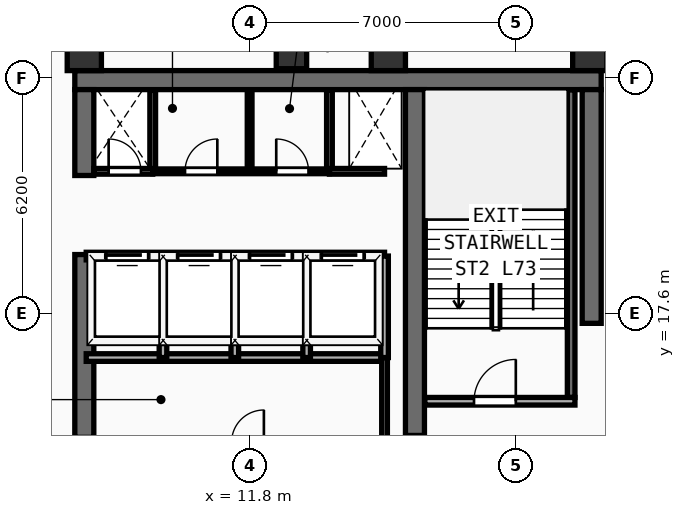
"""IFC4 building model, lengths in metres.
Left out: names, types, materials, properties, quantities, classifications, styles, units other than length and angle.
Written with IfcOpenShell. Run it as: python <this file> out.ifc"""

import sys

from ifc_helpers import new_model, si_unit, direction, frame, frame_2d, origin, origin_2d, place, context, subcontext, project, spatial, rectangle, extrude, element, fill, save


model = new_model("IFC4")
c1 = context("Model", 3, precision=1e-05, world=origin(), true_north=direction((0.0, 1.0)))
c2 = subcontext(c1, "Body", "Model", "MODEL_VIEW")
j1 = project(units=[si_unit("LENGTHUNIT", "METRE"), si_unit("PLANEANGLEUNIT", "RADIAN")], contexts=[c1])
p1 = place(None, origin())
s1 = spatial("IfcSite", under=j1, at=p1, CompositionType="ELEMENT")
p2 = place(p1, origin())
s2 = spatial("IfcBuilding", under=s1, at=p2, CompositionType="ELEMENT")
p3 = place(p2, frame((0.0, 0.0, 285.6)))
s3 = spatial("IfcBuildingStorey", under=s2, at=p3, CompositionType="ELEMENT", Elevation=285.6)
p4 = place(p3, frame((7.2, 23.75, 0.0), z_axis=(0.0, 0.0, 1.0), x_axis=(1.0, 0.0, 0.0)))
e1 = element("IfcWall", 1, at=p4, inside=s3, PredefinedType="SHEAR", context=c2, shape_type="SweptSolid", body=[
    extrude(rectangle(XDim=13.85, YDim=0.5, at=frame_2d((6.925, 0.0))), origin(), (0.0, 0.0, 1.0), 3.56),
])
p5 = place(p3, frame((7.45, 14.35, 0.0), z_axis=(0.0, 0.0, 1.0), x_axis=(0.0, 1.0, 0.0)))
e2 = element("IfcWall", 2, at=p5, inside=s3, PredefinedType="SHEAR", context=c2, shape_type="SweptSolid", body=[
    extrude(rectangle(XDim=4.81, YDim=0.5, at=frame_2d((2.405, 0.0))), origin(), (0.0, 0.0, 1.0), 3.56),
])
p6 = place(p3, frame((7.45, 21.24, 0.0), z_axis=(0.0, 0.0, 1.0), x_axis=(0.0, 1.0, 0.0)))
e3 = element("IfcWall", 3, at=p6, inside=s3, PredefinedType="SHEAR", context=c2, shape_type="SweptSolid", body=[
    extrude(rectangle(XDim=2.26, YDim=0.5, at=frame_2d((1.13, 0.0))), origin(), (0.0, 0.0, 1.0), 3.56),
])
p7 = place(p3, frame((20.8, 17.35, 0.0), z_axis=(0.0, 0.0, 1.0), x_axis=(0.0, 1.0, 0.0)))
e4 = element("IfcWall", 4, at=p7, inside=s3, PredefinedType="SHEAR", context=c2, shape_type="SweptSolid", body=[
    extrude(rectangle(XDim=6.15, YDim=0.5, at=frame_2d((3.075, 0.0))), origin(), (0.0, 0.0, 1.0), 3.56),
])
p8 = place(p3, frame((16.15, 14.4, 0.0), z_axis=(0.0, 0.0, 1.0), x_axis=(0.0, 1.0, 0.0)))
e5 = element("IfcWall", 5, at=p8, inside=s3, PredefinedType="SHEAR", context=c2, shape_type="SweptSolid", body=[
    extrude(rectangle(XDim=9.1, YDim=0.5, at=frame_2d((4.55, 0.0))), origin(), (0.0, 0.0, 1.0), 3.56),
])
for number, where, z_axis, x_axis in (
    (6, (7.45, 24.45, 0.0), (0.0, 0.0, 1.0), (1.0, 0.0, 0.0)),
    (7, (15.45, 24.45, 0.0), (0.0, 0.0, 1.0), (1.0, 0.0, 0.0)),
    (8, (20.75, 24.45, 0.0), (0.0, 0.0, 1.0), (1.0, 0.0, 0.0)),
):
    element("IfcColumn", number, at=place(p3, frame(where, z_axis=z_axis, x_axis=x_axis)), inside=s3, PredefinedType="COLUMN", context=c2, shape_type="SweptSolid", body=[
        extrude(rectangle(XDim=0.9, YDim=0.9, at=origin_2d()), origin(), (0.0, 0.0, 1.0), 3.56),
    ])
p9 = place(p3, frame((12.9, 24.45, 0.0), z_axis=(0.0, 0.0, 1.0), x_axis=(1.0, 0.0, 0.0)))
e9 = element("IfcColumn", 9, at=p9, inside=s3, PredefinedType="COLUMN", context=c2, shape_type="SweptSolid", body=[
    extrude(rectangle(XDim=0.8, YDim=0.8, at=origin_2d()), origin(), (0.0, 0.0, 1.0), 3.56),
])
p10 = place(p3, frame((27.622, 19.712, 0.0), z_axis=(0.0, 0.0, 1.0), x_axis=(-0.707120040392, 0.707093521733, 0.0)))
e10 = element("IfcWall", 10, at=p10, inside=s3, PredefinedType="SOLIDWALL", context=c2, shape_type="SweptSolid", body=[
    extrude(rectangle(XDim=9.206, YDim=0.28, at=frame_2d((4.603, 0.0))), origin(), (0.0, 0.0, 1.0), 3.56),
])
p11 = place(p3, frame((20.26, 15.4, 0.0), z_axis=(0.0, 0.0, 1.0), x_axis=(0.0, 1.0, 0.0)))
e11 = element("IfcWall", 11, at=p11, inside=s3, PredefinedType="SHEAR", context=c2, shape_type="SweptSolid", body=[
    extrude(rectangle(XDim=8.09, YDim=0.2, at=frame_2d((4.045, 0.0))), origin(), (0.0, 0.0, 1.0), 3.56),
])
p12 = place(p3, frame((16.41, 15.3, 0.0), z_axis=(0.0, 0.0, 1.0), x_axis=(1.0, 0.0, 0.0)))
e12 = element("IfcWall", 12, at=p12, inside=s3, PredefinedType="PARTITIONING", context=c2, shape_type="SweptSolid", body=[
    extrude(rectangle(XDim=3.95, YDim=0.2, at=frame_2d((1.975, 0.0))), origin(), (0.0, 0.0, 1.0), 3.56),
])
p13 = place(p12, frame((1.294, 0.0, 0.0)))
e13 = element("IfcOpeningElement", 13, at=p13, cuts=e12, PredefinedType="OPENING", context=c2, shape_type="SweptSolid", body=[
    extrude(rectangle(XDim=1.1, YDim=2.2, at=frame_2d((0.55, 1.1))), frame((0.0, 0.11, 0.0), z_axis=(0.0, -1.0, 0.0), x_axis=(1.0, 0.0, 0.0)), (0.0, 0.0, 1.0), 0.22),
])
p14 = place(p3, frame((7.5, 16.45, 0.0), z_axis=(0.0, 0.0, 1.0), x_axis=(1.0, 0.0, 0.0)))
e14 = element("IfcWall", 14, at=p14, inside=s3, PredefinedType="PARTITIONING", context=c2, shape_type="SweptSolid", body=[
    extrude(rectangle(XDim=7.85, YDim=0.2, at=frame_2d((3.925, 0.0))), origin(), (0.0, 0.0, 1.0), 3.56),
])
p15 = place(p3, frame((15.35, 14.22, 0.0), z_axis=(0.0, 0.0, 1.0), x_axis=(0.0, 1.0, 0.0)))
e15 = element("IfcWall", 15, at=p15, inside=s3, PredefinedType="PARTITIONING", context=c2, shape_type="SweptSolid", body=[
    extrude(rectangle(XDim=2.23, YDim=0.15, at=frame_2d((1.115, 0.0))), origin(), (0.0, 0.0, 1.0), 3.56),
])
p16 = place(p3, frame((7.5, 19.12, 0.0), z_axis=(0.0, 0.0, 1.0), x_axis=(1.0, 0.0, 0.0)))
e16 = element("IfcWall", 16, at=p16, inside=s3, PredefinedType="PARTITIONING", context=c2, shape_type="SweptSolid", body=[
    extrude(rectangle(XDim=7.85, YDim=0.2, at=frame_2d((3.925, 0.0))), origin(), (0.0, 0.0, 1.0), 3.56),
])
p17 = place(p16, frame((0.53, 0.0, 0.0)))
e17 = element("IfcOpeningElement", 17, at=p17, cuts=e16, PredefinedType="OPENING", context=c2, shape_type="SweptSolid", body=[
    extrude(rectangle(XDim=1.1, YDim=2.2, at=frame_2d((0.55, 1.1))), frame((0.0, 0.11, 0.0), z_axis=(0.0, -1.0, 0.0), x_axis=(1.0, 0.0, 0.0)), (0.0, 0.0, 1.0), 0.22),
])
p18 = place(p16, frame((2.42, 0.0, 0.0)))
e18 = element("IfcOpeningElement", 18, at=p18, cuts=e16, PredefinedType="OPENING", context=c2, shape_type="SweptSolid", body=[
    extrude(rectangle(XDim=1.1, YDim=2.2, at=frame_2d((0.55, 1.1))), frame((0.0, 0.11, 0.0), z_axis=(0.0, -1.0, 0.0), x_axis=(1.0, 0.0, 0.0)), (0.0, 0.0, 1.0), 0.22),
])
p19 = place(p16, frame((4.31, 0.0, 0.0)))
e19 = element("IfcOpeningElement", 19, at=p19, cuts=e16, PredefinedType="OPENING", context=c2, shape_type="SweptSolid", body=[
    extrude(rectangle(XDim=1.1, YDim=2.2, at=frame_2d((0.55, 1.1))), frame((0.0, 0.11, 0.0), z_axis=(0.0, -1.0, 0.0), x_axis=(1.0, 0.0, 0.0)), (0.0, 0.0, 1.0), 0.22),
])
p20 = place(p16, frame((6.2, 0.0, 0.0)))
e20 = element("IfcOpeningElement", 20, at=p20, cuts=e16, PredefinedType="OPENING", context=c2, shape_type="SweptSolid", body=[
    extrude(rectangle(XDim=1.1, YDim=2.2, at=frame_2d((0.55, 1.1))), frame((0.0, 0.11, 0.0), z_axis=(0.0, -1.0, 0.0), x_axis=(1.0, 0.0, 0.0)), (0.0, 0.0, 1.0), 0.22),
])
for number, where, z_axis, x_axis in (
    (21, (15.35, 16.45, 0.0), (0.0, 0.0, 1.0), (0.0, 1.0, 0.0)),
    (22, (9.52, 16.45, 0.0), (0.0, 0.0, 1.0), (0.0, 1.0, 0.0)),
    (23, (11.41, 16.45, 0.0), (0.0, 0.0, 1.0), (0.0, 1.0, 0.0)),
    (24, (13.3, 16.45, 0.0), (0.0, 0.0, 1.0), (0.0, 1.0, 0.0)),
):
    element("IfcWall", number, at=place(p3, frame(where, z_axis=z_axis, x_axis=x_axis)), inside=s3, PredefinedType="PARTITIONING", context=c2, shape_type="SweptSolid", body=[
        extrude(rectangle(XDim=2.67, YDim=0.2, at=frame_2d((1.335, 0.0))), origin(), (0.0, 0.0, 1.0), 3.56),
    ])
for number, where, z_axis, x_axis in (
    (25, (9.25, 21.35, 0.0), (0.0, 0.0, 1.0), (0.0, 1.0, 0.0)),
    (26, (13.9, 21.35, 0.0), (0.0, 0.0, 1.0), (0.0, 1.0, 0.0)),
):
    element("IfcWall", number, at=place(p3, frame(where, z_axis=z_axis, x_axis=x_axis)), inside=s3, PredefinedType="PARTITIONING", context=c2, shape_type="SweptSolid", body=[
        extrude(rectangle(XDim=2.13, YDim=0.15, at=frame_2d((1.065, 0.0))), origin(), (0.0, 0.0, 1.0), 3.56),
    ])
p21 = place(p3, frame((7.7, 21.35, 0.0), z_axis=(0.0, 0.0, 1.0), x_axis=(1.0, 0.0, 0.0)))
e27 = element("IfcWall", 27, at=p21, inside=s3, PredefinedType="PARTITIONING", context=c2, shape_type="SweptSolid", body=[
    extrude(rectangle(XDim=1.55, YDim=0.15, at=frame_2d((0.775, 0.0))), origin(), (0.0, 0.0, 1.0), 3.56),
])
p22 = place(p21, frame((0.39, 0.0, 0.0)))
e28 = element("IfcOpeningElement", 28, at=p22, cuts=e27, PredefinedType="OPENING", context=c2, shape_type="SweptSolid", body=[
    extrude(rectangle(XDim=0.85, YDim=2.15, at=frame_2d((0.425, 1.075))), frame((0.0, 0.085, 0.0), z_axis=(0.0, -1.0, 0.0), x_axis=(1.0, 0.0, 0.0)), (0.0, 0.0, 1.0), 0.17),
])
p23 = place(p3, frame((13.9, 21.35, 0.0), z_axis=(0.0, 0.0, 1.0), x_axis=(1.0, 0.0, 0.0)))
e29 = element("IfcWall", 29, at=p23, inside=s3, PredefinedType="PARTITIONING", context=c2, shape_type="SweptSolid", body=[
    extrude(rectangle(XDim=1.45, YDim=0.15, at=frame_2d((0.725, 0.0))), origin(), (0.0, 0.0, 1.0), 3.56),
])
p24 = place(p3, frame((9.25, 21.35, 0.0), z_axis=(0.0, 0.0, 1.0), x_axis=(1.0, 0.0, 0.0)))
e30 = element("IfcWall", 30, at=p24, inside=s3, PredefinedType="PARTITIONING", context=c2, shape_type="SweptSolid", body=[
    extrude(rectangle(XDim=4.65, YDim=0.125, at=frame_2d((2.325, 0.0))), origin(), (0.0, 0.0, 1.0), 3.56),
])
p25 = place(p24, frame((0.85, 0.0, 0.0)))
e31 = element("IfcOpeningElement", 31, at=p25, cuts=e30, PredefinedType="OPENING", context=c2, shape_type="SweptSolid", body=[
    extrude(rectangle(XDim=0.85, YDim=2.15, at=frame_2d((0.425, 1.075))), frame((0.0, 0.073, 0.0), z_axis=(0.0, -1.0, 0.0), x_axis=(1.0, 0.0, 0.0)), (0.0, 0.0, 1.0), 0.145),
])
p26 = place(p24, frame((3.25, 0.0, 0.0)))
e32 = element("IfcOpeningElement", 32, at=p26, cuts=e30, PredefinedType="OPENING", context=c2, shape_type="SweptSolid", body=[
    extrude(rectangle(XDim=0.85, YDim=2.15, at=frame_2d((0.425, 1.075))), frame((0.0, 0.073, 0.0), z_axis=(0.0, -1.0, 0.0), x_axis=(1.0, 0.0, 0.0)), (0.0, 0.0, 1.0), 0.145),
])
p27 = place(p3, frame((11.8, 21.35, 0.0), z_axis=(0.0, 0.0, 1.0), x_axis=(0.0, 1.0, 0.0)))
e33 = element("IfcWall", 33, at=p27, inside=s3, PredefinedType="PARTITIONING", context=c2, shape_type="SweptSolid", body=[
    extrude(rectangle(XDim=2.13, YDim=0.125, at=frame_2d((1.065, 0.0))), origin(), (0.0, 0.0, 1.0), 3.56),
])
p28 = place(p13, origin())
e34 = element("IfcDoor", 34, at=p28, inside=s3, OperationType="SINGLE_SWING_RIGHT", PredefinedType="DOOR", context=c2, shape_type="SweptSolid", body=[
    extrude(rectangle(XDim=1.1, YDim=2.2, at=frame_2d((0.55, 1.1))), frame((0.0, 0.025, 0.0), z_axis=(0.0, -1.0, 0.0), x_axis=(1.0, 0.0, 0.0)), (0.0, 0.0, 1.0), 0.05),
])
fill(e13, e34)
p29 = place(p17, origin())
e35 = element("IfcDoor", 35, at=p29, inside=s3, OperationType="SLIDING_TO_LEFT", PredefinedType="DOOR", context=c2, shape_type="SweptSolid", body=[
    extrude(rectangle(XDim=1.1, YDim=2.2, at=frame_2d((0.55, 1.1))), frame((0.0, 0.025, 0.0), z_axis=(0.0, -1.0, 0.0), x_axis=(1.0, 0.0, 0.0)), (0.0, 0.0, 1.0), 0.05),
])
fill(e17, e35)
p30 = place(p18, origin())
e36 = element("IfcDoor", 36, at=p30, inside=s3, OperationType="SLIDING_TO_LEFT", PredefinedType="DOOR", context=c2, shape_type="SweptSolid", body=[
    extrude(rectangle(XDim=1.1, YDim=2.2, at=frame_2d((0.55, 1.1))), frame((0.0, 0.025, 0.0), z_axis=(0.0, -1.0, 0.0), x_axis=(1.0, 0.0, 0.0)), (0.0, 0.0, 1.0), 0.05),
])
fill(e18, e36)
p31 = place(p19, origin())
e37 = element("IfcDoor", 37, at=p31, inside=s3, OperationType="SLIDING_TO_LEFT", PredefinedType="DOOR", context=c2, shape_type="SweptSolid", body=[
    extrude(rectangle(XDim=1.1, YDim=2.2, at=frame_2d((0.55, 1.1))), frame((0.0, 0.025, 0.0), z_axis=(0.0, -1.0, 0.0), x_axis=(1.0, 0.0, 0.0)), (0.0, 0.0, 1.0), 0.05),
])
fill(e19, e37)
p32 = place(p20, origin())
e38 = element("IfcDoor", 38, at=p32, inside=s3, OperationType="SLIDING_TO_LEFT", PredefinedType="DOOR", context=c2, shape_type="SweptSolid", body=[
    extrude(rectangle(XDim=1.1, YDim=2.2, at=frame_2d((0.55, 1.1))), frame((0.0, 0.025, 0.0), z_axis=(0.0, -1.0, 0.0), x_axis=(1.0, 0.0, 0.0)), (0.0, 0.0, 1.0), 0.05),
])
fill(e20, e38)
p33 = place(p22, origin())
e39 = element("IfcDoor", 39, at=p33, inside=s3, OperationType="SINGLE_SWING_LEFT", PredefinedType="DOOR", context=c2, shape_type="SweptSolid", body=[
    extrude(rectangle(XDim=0.85, YDim=2.15, at=frame_2d((0.425, 1.075))), frame((0.0, 0.025, 0.0), z_axis=(0.0, -1.0, 0.0), x_axis=(1.0, 0.0, 0.0)), (0.0, 0.0, 1.0), 0.05),
])
fill(e28, e39)
p34 = place(p25, origin())
e40 = element("IfcDoor", 40, at=p34, inside=s3, OperationType="SINGLE_SWING_RIGHT", PredefinedType="DOOR", context=c2, shape_type="SweptSolid", body=[
    extrude(rectangle(XDim=0.85, YDim=2.15, at=frame_2d((0.425, 1.075))), frame((0.0, 0.025, 0.0), z_axis=(0.0, -1.0, 0.0), x_axis=(1.0, 0.0, 0.0)), (0.0, 0.0, 1.0), 0.05),
])
fill(e31, e40)
p35 = place(p26, origin())
e41 = element("IfcDoor", 41, at=p35, inside=s3, OperationType="SINGLE_SWING_LEFT", PredefinedType="DOOR", context=c2, shape_type="SweptSolid", body=[
    extrude(rectangle(XDim=0.85, YDim=2.15, at=frame_2d((0.425, 1.075))), frame((0.0, 0.025, 0.0), z_axis=(0.0, -1.0, 0.0), x_axis=(1.0, 0.0, 0.0)), (0.0, 0.0, 1.0), 0.05),
])
fill(e32, e41)
save(model, sys.argv[1])
